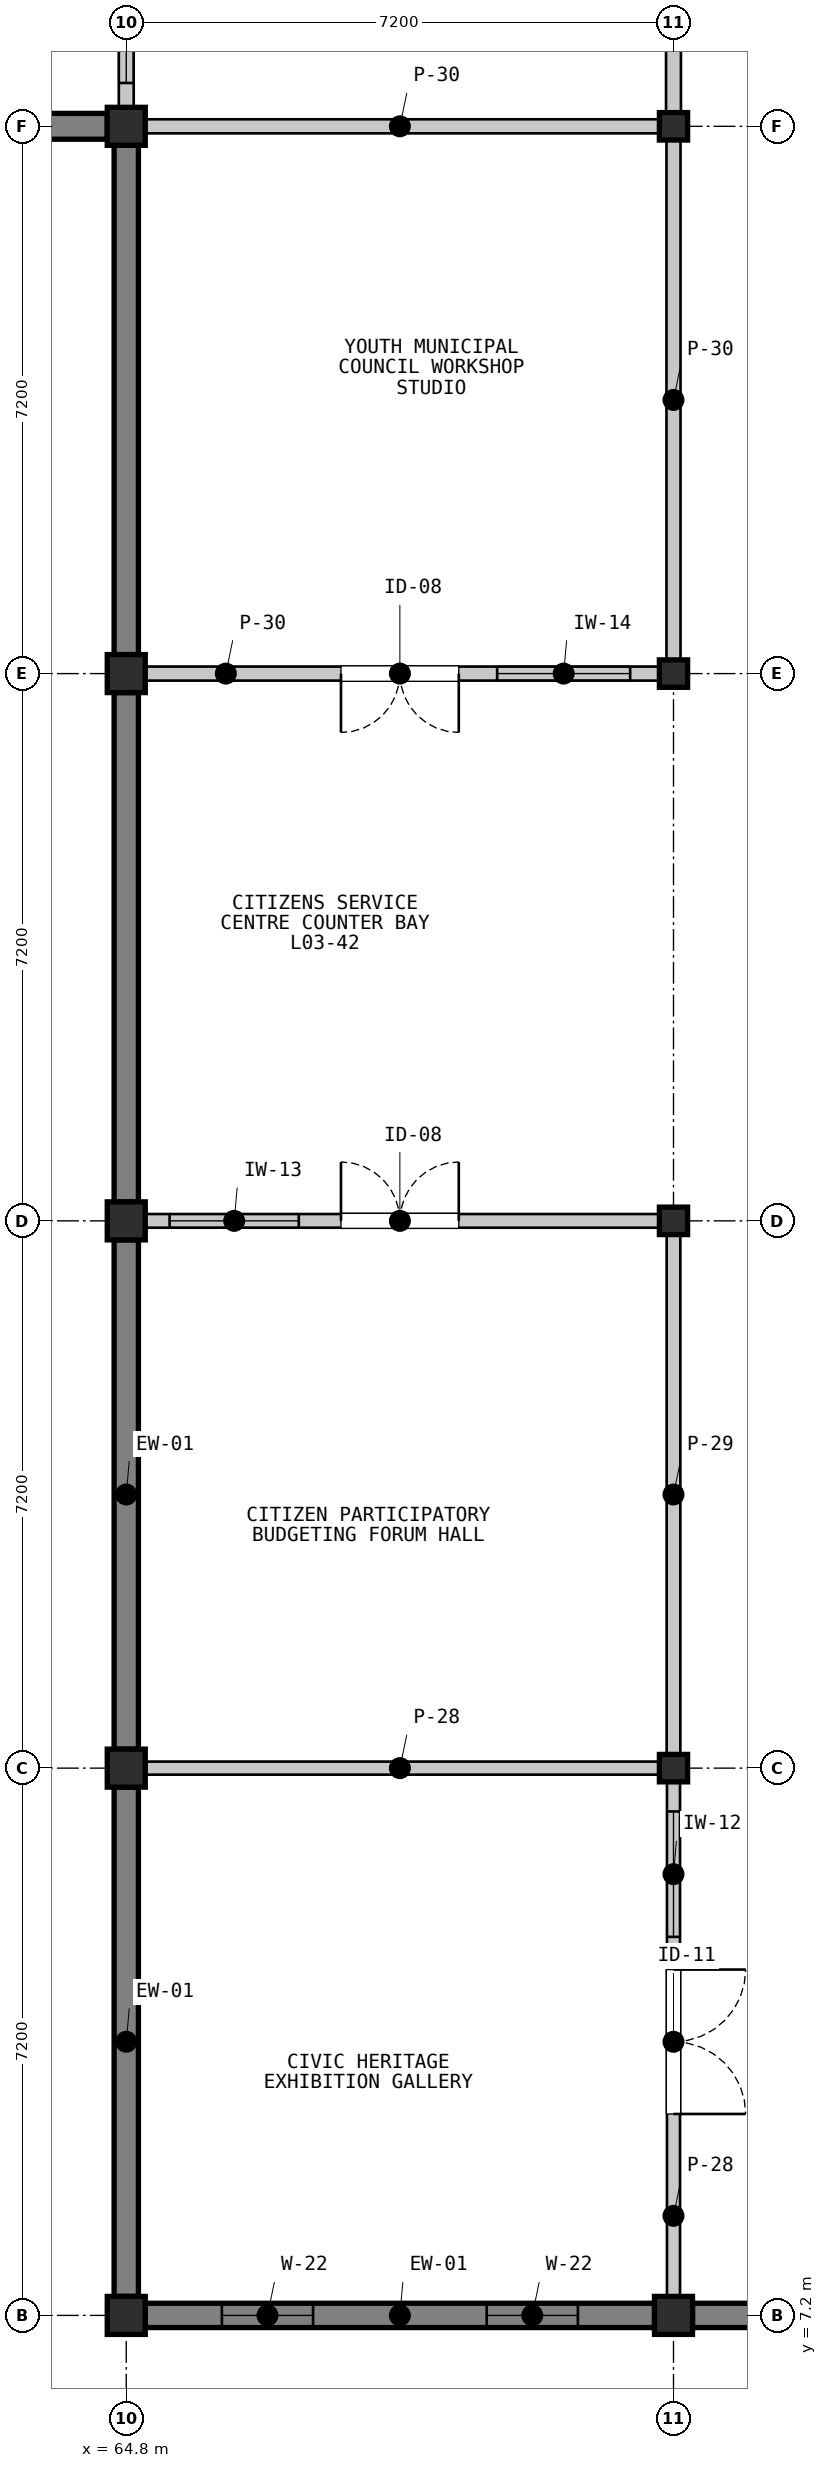
"""IFC4 building model, lengths in metres.
Left out: names, types, materials, properties, quantities, classifications, styles, units other than length and angle.
Written with IfcOpenShell. Run it as: python <this file> out.ifc"""

import sys

from ifc_helpers import new_model, si_unit, direction, frame, frame_2d, origin, origin_2d, place, context, subcontext, project, spatial, rectangle, i_section, extrude, element, fill, save


model = new_model("IFC4")
c1 = context("Model", 3, precision=1e-05, world=origin(), true_north=direction((0.0, 1.0)))
c2 = subcontext(c1, "Body", "Model", "MODEL_VIEW")
j1 = project(units=[si_unit("LENGTHUNIT", "METRE"), si_unit("PLANEANGLEUNIT", "RADIAN")], contexts=[c1])
p1 = place(None, origin())
s1 = spatial("IfcSite", under=j1, at=p1, CompositionType="ELEMENT")
p2 = place(p1, origin())
s2 = spatial("IfcBuilding", under=s1, at=p2, CompositionType="ELEMENT")
p3 = place(p2, frame((0.0, 0.0, 9.9)))
s3 = spatial("IfcBuildingStorey", under=s2, at=p3, CompositionType="ELEMENT", Elevation=9.9)
for number, where, z_axis, x_axis in (
    (1, (64.8, 7.2, 0.0), (0.0, 0.0, 1.0), (1.0, 0.0, 0.0)),
    (2, (64.8, 14.4, 0.0), (0.0, 0.0, 1.0), (1.0, 0.0, 0.0)),
    (3, (64.8, 21.6, 0.0), (0.0, 0.0, 1.0), (1.0, 0.0, 0.0)),
    (4, (64.8, 28.8, 0.0), (0.0, 0.0, 1.0), (1.0, 0.0, 0.0)),
    (5, (64.8, 36.0, 0.0), (0.0, 0.0, 1.0), (1.0, 0.0, 0.0)),
    (6, (72.0, 7.2, 0.0), (0.0, 0.0, 1.0), (1.0, 0.0, 0.0)),
):
    element("IfcColumn", number, at=place(p3, frame(where, z_axis=z_axis, x_axis=x_axis)), inside=s3, PredefinedType="COLUMN", context=c2, shape_type="SweptSolid", body=[
        extrude(rectangle(XDim=0.5, YDim=0.5, at=origin_2d()), origin(), (0.0, 0.0, 1.0), 4.2),
    ])
for number, where, z_axis, x_axis in (
    (7, (72.0, 14.4, 0.0), (0.0, 0.0, 1.0), (1.0, 0.0, 0.0)),
    (8, (72.0, 21.6, 0.0), (0.0, 0.0, 1.0), (1.0, 0.0, 0.0)),
    (9, (72.0, 28.8, 0.0), (0.0, 0.0, 1.0), (1.0, 0.0, 0.0)),
    (10, (72.0, 36.0, 0.0), (0.0, 0.0, 1.0), (1.0, 0.0, 0.0)),
):
    element("IfcColumn", number, at=place(p3, frame(where, z_axis=z_axis, x_axis=x_axis)), inside=s3, PredefinedType="COLUMN", context=c2, shape_type="SweptSolid", body=[
        extrude(i_section(OverallWidth=0.371, OverallDepth=0.361, WebThickness=0.012, FlangeThickness=0.02, FilletRadius=0.015, at=origin_2d()), origin(), (0.0, 0.0, 1.0), 4.2),
    ])
p4 = place(p3, frame((64.55, 36.0, 0.0), z_axis=(0.0, 0.0, 1.0), x_axis=(-1.0, 0.0, 0.0)))
e11 = element("IfcWall", 11, at=p4, inside=s3, PredefinedType="SOLIDWALL", context=c2, shape_type="SweptSolid", body=[
    extrude(rectangle(XDim=6.7, YDim=0.34, at=frame_2d((3.35, 0.0))), origin(), (0.0, 0.0, 1.0), 3.398),
])
p5 = place(p4, frame((1.008, 0.0, 0.95)))
e12 = element("IfcOpeningElement", 12, at=p5, cuts=e11, PredefinedType="OPENING", context=c2, shape_type="SweptSolid", body=[
    extrude(rectangle(XDim=1.2, YDim=1.7, at=frame_2d((0.6, 0.85))), frame((0.0, 0.18, 0.0), z_axis=(0.0, -1.0, 0.0), x_axis=(1.0, 0.0, 0.0)), (0.0, 0.0, 1.0), 0.36),
])
p6 = place(p4, frame((4.492, 0.0, 0.95)))
e13 = element("IfcOpeningElement", 13, at=p6, cuts=e11, PredefinedType="OPENING", context=c2, shape_type="SweptSolid", body=[
    extrude(rectangle(XDim=1.2, YDim=1.7, at=frame_2d((0.6, 0.85))), frame((0.0, 0.18, 0.0), z_axis=(0.0, -1.0, 0.0), x_axis=(1.0, 0.0, 0.0)), (0.0, 0.0, 1.0), 0.36),
])
p7 = place(p3, frame((71.75, 7.2, 0.0), z_axis=(0.0, 0.0, 1.0), x_axis=(-1.0, 0.0, 0.0)))
e14 = element("IfcWall", 14, at=p7, inside=s3, PredefinedType="SOLIDWALL", context=c2, shape_type="SweptSolid", body=[
    extrude(rectangle(XDim=6.7, YDim=0.32, at=frame_2d((3.35, 0.0))), origin(), (0.0, 0.0, 1.0), 3.418),
])
p8 = place(p7, frame((1.008, 0.0, 0.95)))
e15 = element("IfcOpeningElement", 15, at=p8, cuts=e14, PredefinedType="OPENING", context=c2, shape_type="SweptSolid", body=[
    extrude(rectangle(XDim=1.2, YDim=1.7, at=frame_2d((0.6, 0.85))), frame((0.0, 0.17, 0.0), z_axis=(0.0, -1.0, 0.0), x_axis=(1.0, 0.0, 0.0)), (0.0, 0.0, 1.0), 0.34),
])
p9 = place(p7, frame((4.492, 0.0, 0.95)))
e16 = element("IfcOpeningElement", 16, at=p9, cuts=e14, PredefinedType="OPENING", context=c2, shape_type="SweptSolid", body=[
    extrude(rectangle(XDim=1.2, YDim=1.7, at=frame_2d((0.6, 0.85))), frame((0.0, 0.17, 0.0), z_axis=(0.0, -1.0, 0.0), x_axis=(1.0, 0.0, 0.0)), (0.0, 0.0, 1.0), 0.34),
])
p10 = place(p3, frame((64.8, 7.45, 0.0), z_axis=(0.0, 0.0, 1.0), x_axis=(0.0, 1.0, 0.0)))
e17 = element("IfcWall", 17, at=p10, inside=s3, PredefinedType="SOLIDWALL", context=c2, shape_type="SweptSolid", body=[
    extrude(rectangle(XDim=6.7, YDim=0.32, at=frame_2d((3.35, 0.0))), origin(), (0.0, 0.0, 1.0), 3.487),
])
p11 = place(p3, frame((64.8, 14.65, 0.0), z_axis=(0.0, 0.0, 1.0), x_axis=(0.0, 1.0, 0.0)))
e18 = element("IfcWall", 18, at=p11, inside=s3, PredefinedType="SOLIDWALL", context=c2, shape_type="SweptSolid", body=[
    extrude(rectangle(XDim=6.7, YDim=0.32, at=frame_2d((3.35, 0.0))), origin(), (0.0, 0.0, 1.0), 3.487),
])
for number, where, z_axis, x_axis in (
    (19, (64.8, 21.85, 0.0), (0.0, 0.0, 1.0), (0.0, 1.0, 0.0)),
    (20, (64.8, 29.05, 0.0), (0.0, 0.0, 1.0), (0.0, 1.0, 0.0)),
):
    element("IfcWall", number, at=place(p3, frame(where, z_axis=z_axis, x_axis=x_axis)), inside=s3, PredefinedType="SOLIDWALL", context=c2, shape_type="SweptSolid", body=[
        extrude(rectangle(XDim=6.7, YDim=0.32, at=frame_2d((3.35, 0.0))), origin(), (0.0, 0.0, 1.0), 3.487),
    ])
p12 = place(p3, frame((78.95, 7.2, 0.0), z_axis=(0.0, 0.0, 1.0), x_axis=(-1.0, 0.0, 0.0)))
e21 = element("IfcWall", 21, at=p12, inside=s3, PredefinedType="SOLIDWALL", context=c2, shape_type="SweptSolid", body=[
    extrude(rectangle(XDim=6.7, YDim=0.32, at=frame_2d((3.35, 0.0))), origin(), (0.0, 0.0, 1.0), 3.418),
])
p13 = place(p12, frame((1.008, 0.0, 0.95)))
e22 = element("IfcOpeningElement", 22, at=p13, cuts=e21, PredefinedType="OPENING", context=c2, shape_type="SweptSolid", body=[
    extrude(rectangle(XDim=1.2, YDim=1.7, at=frame_2d((0.6, 0.85))), frame((0.0, 0.17, 0.0), z_axis=(0.0, -1.0, 0.0), x_axis=(1.0, 0.0, 0.0)), (0.0, 0.0, 1.0), 0.34),
])
p14 = place(p12, frame((4.492, 0.0, 0.95)))
e23 = element("IfcOpeningElement", 23, at=p14, cuts=e21, PredefinedType="OPENING", context=c2, shape_type="SweptSolid", body=[
    extrude(rectangle(XDim=1.2, YDim=1.7, at=frame_2d((0.6, 0.85))), frame((0.0, 0.17, 0.0), z_axis=(0.0, -1.0, 0.0), x_axis=(1.0, 0.0, 0.0)), (0.0, 0.0, 1.0), 0.34),
])
p15 = place(p3, frame((72.0, 14.28, 0.0), z_axis=(0.0, 0.0, 1.0), x_axis=(0.0, -1.0, 0.0)))
e24 = element("IfcWall", 24, at=p15, inside=s3, PredefinedType="PARTITIONING", context=c2, shape_type="SweptSolid", body=[
    extrude(rectangle(XDim=6.96, YDim=0.172, at=frame_2d((3.48, 0.0))), origin(), (0.0, 0.0, 1.0), 3.408),
])
p16 = place(p15, frame((2.53, 0.0, 0.0)))
e25 = element("IfcOpeningElement", 25, at=p16, cuts=e24, PredefinedType="OPENING", context=c2, shape_type="SweptSolid", body=[
    extrude(rectangle(XDim=1.9, YDim=2.45, at=frame_2d((0.95, 1.225))), frame((0.0, 0.096, 0.0), z_axis=(0.0, -1.0, 0.0), x_axis=(1.0, 0.0, 0.0)), (0.0, 0.0, 1.0), 0.192),
])
p17 = place(p15, frame((0.45, 0.0, 1.05)))
e26 = element("IfcOpeningElement", 26, at=p17, cuts=e24, PredefinedType="OPENING", context=c2, shape_type="SweptSolid", body=[
    extrude(rectangle(XDim=1.65, YDim=1.15, at=frame_2d((0.825, 0.575))), frame((0.0, 0.096, 0.0), z_axis=(0.0, -1.0, 0.0), x_axis=(1.0, 0.0, 0.0)), (0.0, 0.0, 1.0), 0.192),
])
p18 = place(p3, frame((64.92, 14.4, 0.0), z_axis=(0.0, 0.0, 1.0), x_axis=(1.0, 0.0, 0.0)))
e27 = element("IfcWall", 27, at=p18, inside=s3, PredefinedType="PARTITIONING", context=c2, shape_type="SweptSolid", body=[
    extrude(rectangle(XDim=6.96, YDim=0.172, at=frame_2d((3.48, 0.0))), origin(), (0.0, 0.0, 1.0), 3.408),
])
p19 = place(p3, frame((64.92, 21.6, 0.0), z_axis=(0.0, 0.0, 1.0), x_axis=(1.0, 0.0, 0.0)))
e28 = element("IfcWall", 28, at=p19, inside=s3, PredefinedType="PARTITIONING", context=c2, shape_type="SweptSolid", body=[
    extrude(rectangle(XDim=6.96, YDim=0.18, at=frame_2d((3.48, 0.0))), origin(), (0.0, 0.0, 1.0), 3.408),
])
p20 = place(p19, frame((2.705, 0.0, 0.0)))
e29 = element("IfcOpeningElement", 29, at=p20, cuts=e28, PredefinedType="OPENING", context=c2, shape_type="SweptSolid", body=[
    extrude(rectangle(XDim=1.55, YDim=2.3, at=frame_2d((0.775, 1.15))), frame((0.0, 0.1, 0.0), z_axis=(0.0, -1.0, 0.0), x_axis=(1.0, 0.0, 0.0)), (0.0, 0.0, 1.0), 0.2),
])
p21 = place(p19, frame((0.45, 0.0, 1.05)))
e30 = element("IfcOpeningElement", 30, at=p21, cuts=e28, PredefinedType="OPENING", context=c2, shape_type="SweptSolid", body=[
    extrude(rectangle(XDim=1.7, YDim=1.18, at=frame_2d((0.85, 0.59))), frame((0.0, 0.1, 0.0), z_axis=(0.0, -1.0, 0.0), x_axis=(1.0, 0.0, 0.0)), (0.0, 0.0, 1.0), 0.2),
])
p22 = place(p3, frame((72.0, 21.48, 0.0), z_axis=(0.0, 0.0, 1.0), x_axis=(0.0, -1.0, 0.0)))
e31 = element("IfcWall", 31, at=p22, inside=s3, PredefinedType="PARTITIONING", context=c2, shape_type="SweptSolid", body=[
    extrude(rectangle(XDim=6.96, YDim=0.18, at=frame_2d((3.48, 0.0))), origin(), (0.0, 0.0, 1.0), 3.408),
])
p23 = place(p3, frame((71.88, 28.8, 0.0), z_axis=(0.0, 0.0, 1.0), x_axis=(-1.0, 0.0, 0.0)))
e32 = element("IfcWall", 32, at=p23, inside=s3, PredefinedType="PARTITIONING", context=c2, shape_type="SweptSolid", body=[
    extrude(rectangle(XDim=6.96, YDim=0.185, at=frame_2d((3.48, 0.0))), origin(), (0.0, 0.0, 1.0), 3.408),
])
p24 = place(p23, frame((2.705, 0.0, 0.0)))
e33 = element("IfcOpeningElement", 33, at=p24, cuts=e32, PredefinedType="OPENING", context=c2, shape_type="SweptSolid", body=[
    extrude(rectangle(XDim=1.55, YDim=2.3, at=frame_2d((0.775, 1.15))), frame((0.0, 0.103, 0.0), z_axis=(0.0, -1.0, 0.0), x_axis=(1.0, 0.0, 0.0)), (0.0, 0.0, 1.0), 0.205),
])
p25 = place(p23, frame((0.45, 0.0, 1.05)))
e34 = element("IfcOpeningElement", 34, at=p25, cuts=e32, PredefinedType="OPENING", context=c2, shape_type="SweptSolid", body=[
    extrude(rectangle(XDim=1.75, YDim=1.18, at=frame_2d((0.875, 0.59))), frame((0.0, 0.103, 0.0), z_axis=(0.0, -1.0, 0.0), x_axis=(1.0, 0.0, 0.0)), (0.0, 0.0, 1.0), 0.205),
])
for number, where, z_axis, x_axis in (
    (35, (64.92, 36.0, 0.0), (0.0, 0.0, 1.0), (1.0, 0.0, 0.0)),
    (36, (72.0, 35.88, 0.0), (0.0, 0.0, 1.0), (0.0, -1.0, 0.0)),
):
    element("IfcWall", number, at=place(p3, frame(where, z_axis=z_axis, x_axis=x_axis)), inside=s3, PredefinedType="PARTITIONING", context=c2, shape_type="SweptSolid", body=[
        extrude(rectangle(XDim=6.96, YDim=0.185, at=frame_2d((3.48, 0.0))), origin(), (0.0, 0.0, 1.0), 3.408),
    ])
p26 = place(p3, frame((64.8, 36.12, 0.0), z_axis=(0.0, 0.0, 1.0), x_axis=(0.0, 1.0, 0.0)))
e37 = element("IfcWall", 37, at=p26, inside=s3, PredefinedType="PARTITIONING", context=c2, shape_type="SweptSolid", body=[
    extrude(rectangle(XDim=6.96, YDim=0.196, at=frame_2d((3.48, 0.0))), origin(), (0.0, 0.0, 1.0), 3.388),
])
p27 = place(p26, frame((2.555, 0.0, 0.0)))
e38 = element("IfcOpeningElement", 38, at=p27, cuts=e37, PredefinedType="OPENING", context=c2, shape_type="SweptSolid", body=[
    extrude(rectangle(XDim=1.85, YDim=2.45, at=frame_2d((0.925, 1.225))), frame((0.0, 0.108, 0.0), z_axis=(0.0, -1.0, 0.0), x_axis=(1.0, 0.0, 0.0)), (0.0, 0.0, 1.0), 0.216),
])
p28 = place(p26, frame((0.45, 0.0, 1.05)))
e39 = element("IfcOpeningElement", 39, at=p28, cuts=e37, PredefinedType="OPENING", context=c2, shape_type="SweptSolid", body=[
    extrude(rectangle(XDim=1.85, YDim=1.18, at=frame_2d((0.925, 0.59))), frame((0.0, 0.108, 0.0), z_axis=(0.0, -1.0, 0.0), x_axis=(1.0, 0.0, 0.0)), (0.0, 0.0, 1.0), 0.216),
])
p29 = place(p3, frame((72.0, 43.08, 0.0), z_axis=(0.0, 0.0, 1.0), x_axis=(0.0, -1.0, 0.0)))
e40 = element("IfcWall", 40, at=p29, inside=s3, PredefinedType="PARTITIONING", context=c2, shape_type="SweptSolid", body=[
    extrude(rectangle(XDim=6.96, YDim=0.196, at=frame_2d((3.48, 0.0))), origin(), (0.0, 0.0, 1.0), 3.408),
])
p30 = place(p8, origin())
e41 = element("IfcWindow", 41, at=p30, inside=s3, PartitioningType="SINGLE_PANEL", PredefinedType="WINDOW", context=c2, shape_type="SweptSolid", body=[
    extrude(rectangle(XDim=1.2, YDim=1.7, at=frame_2d((0.6, 0.85))), frame((0.0, 0.03, 0.0), z_axis=(0.0, -1.0, 0.0), x_axis=(1.0, 0.0, 0.0)), (0.0, 0.0, 1.0), 0.06),
])
fill(e15, e41)
p31 = place(p9, origin())
e42 = element("IfcWindow", 42, at=p31, inside=s3, PartitioningType="SINGLE_PANEL", PredefinedType="WINDOW", context=c2, shape_type="SweptSolid", body=[
    extrude(rectangle(XDim=1.2, YDim=1.7, at=frame_2d((0.6, 0.85))), frame((0.0, 0.03, 0.0), z_axis=(0.0, -1.0, 0.0), x_axis=(1.0, 0.0, 0.0)), (0.0, 0.0, 1.0), 0.06),
])
fill(e16, e42)
p32 = place(p16, origin())
e43 = element("IfcDoor", 43, at=p32, inside=s3, OperationType="DOUBLE_DOOR_SINGLE_SWING", PredefinedType="DOOR", context=c2, shape_type="SweptSolid", body=[
    extrude(rectangle(XDim=1.9, YDim=2.45, at=frame_2d((0.95, 1.225))), frame((0.0, 0.025, 0.0), z_axis=(0.0, -1.0, 0.0), x_axis=(1.0, 0.0, 0.0)), (0.0, 0.0, 1.0), 0.05),
])
fill(e25, e43)
p33 = place(p17, origin())
e44 = element("IfcWindow", 44, at=p33, inside=s3, PartitioningType="SINGLE_PANEL", PredefinedType="WINDOW", context=c2, shape_type="SweptSolid", body=[
    extrude(rectangle(XDim=1.65, YDim=1.15, at=frame_2d((0.825, 0.575))), frame((0.0, 0.03, 0.0), z_axis=(0.0, -1.0, 0.0), x_axis=(1.0, 0.0, 0.0)), (0.0, 0.0, 1.0), 0.06),
])
fill(e26, e44)
p34 = place(p20, origin())
e45 = element("IfcDoor", 45, at=p34, inside=s3, OperationType="DOUBLE_DOOR_SINGLE_SWING", PredefinedType="DOOR", context=c2, shape_type="SweptSolid", body=[
    extrude(rectangle(XDim=1.55, YDim=2.3, at=frame_2d((0.775, 1.15))), frame((0.0, 0.025, 0.0), z_axis=(0.0, -1.0, 0.0), x_axis=(1.0, 0.0, 0.0)), (0.0, 0.0, 1.0), 0.05),
])
fill(e29, e45)
p35 = place(p21, origin())
e46 = element("IfcWindow", 46, at=p35, inside=s3, PartitioningType="SINGLE_PANEL", PredefinedType="WINDOW", context=c2, shape_type="SweptSolid", body=[
    extrude(rectangle(XDim=1.7, YDim=1.18, at=frame_2d((0.85, 0.59))), frame((0.0, 0.03, 0.0), z_axis=(0.0, -1.0, 0.0), x_axis=(1.0, 0.0, 0.0)), (0.0, 0.0, 1.0), 0.06),
])
fill(e30, e46)
p36 = place(p24, origin())
e47 = element("IfcDoor", 47, at=p36, inside=s3, OperationType="DOUBLE_DOOR_SINGLE_SWING", PredefinedType="DOOR", context=c2, shape_type="SweptSolid", body=[
    extrude(rectangle(XDim=1.55, YDim=2.3, at=frame_2d((0.775, 1.15))), frame((0.0, 0.025, 0.0), z_axis=(0.0, -1.0, 0.0), x_axis=(1.0, 0.0, 0.0)), (0.0, 0.0, 1.0), 0.05),
])
fill(e33, e47)
p37 = place(p25, origin())
e48 = element("IfcWindow", 48, at=p37, inside=s3, PartitioningType="SINGLE_PANEL", PredefinedType="WINDOW", context=c2, shape_type="SweptSolid", body=[
    extrude(rectangle(XDim=1.75, YDim=1.18, at=frame_2d((0.875, 0.59))), frame((0.0, 0.03, 0.0), z_axis=(0.0, -1.0, 0.0), x_axis=(1.0, 0.0, 0.0)), (0.0, 0.0, 1.0), 0.06),
])
fill(e34, e48)
p38 = place(p28, origin())
e49 = element("IfcWindow", 49, at=p38, inside=s3, PartitioningType="SINGLE_PANEL", PredefinedType="WINDOW", context=c2, shape_type="SweptSolid", body=[
    extrude(rectangle(XDim=1.85, YDim=1.18, at=frame_2d((0.925, 0.59))), frame((0.0, 0.03, 0.0), z_axis=(0.0, -1.0, 0.0), x_axis=(1.0, 0.0, 0.0)), (0.0, 0.0, 1.0), 0.06),
])
fill(e39, e49)
save(model, sys.argv[1])
